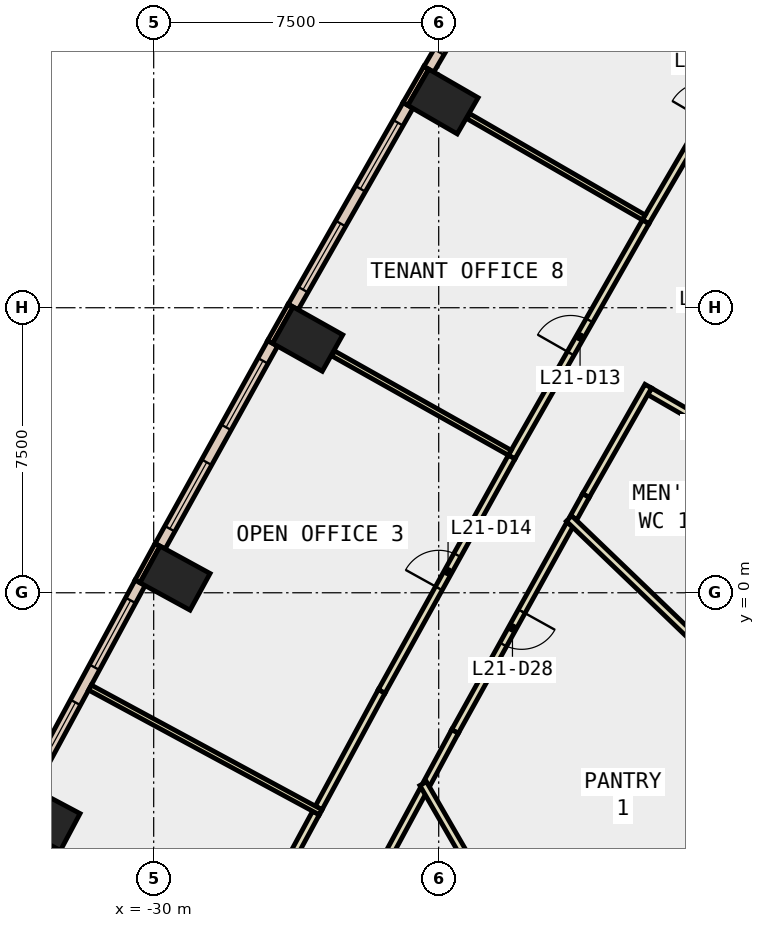
"""IFC4 building model, lengths in metres.
Left out: names, types, materials, properties, quantities, classifications, styles, units other than length and angle.
Written with IfcOpenShell. Run it as: python <this file> out.ifc"""

import sys

from ifc_helpers import new_model, si_unit, direction, frame, frame_2d, origin, origin_2d, place, context, subcontext, project, spatial, rectangle, extrude, element, fill, save


model = new_model("IFC4")
c1 = context("Model", 3, precision=1e-05, world=origin(), true_north=direction((0.0, 1.0)))
c2 = subcontext(c1, "Body", "Model", "MODEL_VIEW")
j1 = project(units=[si_unit("LENGTHUNIT", "METRE"), si_unit("PLANEANGLEUNIT", "RADIAN")], contexts=[c1])
p1 = place(None, origin())
s1 = spatial("IfcSite", under=j1, at=p1, CompositionType="ELEMENT")
p2 = place(p1, origin())
s2 = spatial("IfcBuilding", under=s1, at=p2, CompositionType="ELEMENT")
p3 = place(p2, frame((0.0, 0.0, 99.2)))
s3 = spatial("IfcBuildingStorey", under=s2, at=p3, CompositionType="ELEMENT", Elevation=99.2)
for number, where, z_axis, x_axis in (
    (1, (-22.387, 12.925, -0.4), (0.0, 0.0, 1.0), (0.5, 0.866, 0.0)),
    (2, (-25.948, 6.675, -0.4), (0.0, 0.0, 1.0), (0.49, 0.872, 0.0)),
    (3, (-29.438, 0.385, -0.4), (0.0, 0.0, 1.0), (0.48, 0.877, 0.0)),
    (4, (-32.858, -5.943, -0.4), (0.0, 0.0, 1.0), (0.469, 0.883, 0.0)),
):
    element("IfcColumn", number, at=place(p3, frame(where, z_axis=z_axis, x_axis=x_axis)), inside=s3, PredefinedType="COLUMN", context=c2, shape_type="SweptSolid", body=[
        extrude(rectangle(XDim=1.1, YDim=1.5, at=origin_2d()), origin(), (0.0, 0.0, 1.0), 4.2),
    ])
p4 = place(p3, frame((-9.31, -5.375, -0.4), z_axis=(0.0, 0.0, 1.0), x_axis=(-0.866017533419, -0.500013631625, 0.0)))
e5 = element("IfcWall", 5, at=p4, inside=s3, PredefinedType="SHEAR", context=c2, shape_type="SweptSolid", body=[
    extrude(rectangle(XDim=9.0, YDim=0.8, at=frame_2d((4.5, 0.0))), origin(), (0.0, 0.0, 1.0), 4.2),
])
p5 = place(p3, frame((-22.826, 13.814, 0.0), z_axis=(0.0, 0.0, 1.0), x_axis=(-0.499933745558, -0.866063652425, 0.0)))
e6 = element("IfcWall", 6, at=p5, inside=s3, PredefinedType="STANDARD", context=c2, shape_type="SweptSolid", body=[
    extrude(rectangle(XDim=1.1, YDim=0.15, at=frame_2d((0.55, 0.0))), origin(), (0.0, 0.0, 1.0), 3.8),
])
p6 = place(p3, frame((-26.398, 7.559, 0.0), z_axis=(0.0, 0.0, 1.0), x_axis=(-0.490008344094, -0.871717742574, 0.0)))
e7 = element("IfcWall", 7, at=p6, inside=s3, PredefinedType="STANDARD", context=c2, shape_type="SweptSolid", body=[
    extrude(rectangle(XDim=1.1, YDim=0.15, at=frame_2d((0.55, 0.0))), origin(), (0.0, 0.0, 1.0), 3.8),
])
p7 = place(p3, frame((-29.898, 1.264, 0.0), z_axis=(0.0, 0.0, 1.0), x_axis=(-0.479737645119, -0.877411985247, 0.0)))
e8 = element("IfcWall", 8, at=p7, inside=s3, PredefinedType="STANDARD", context=c2, shape_type="SweptSolid", body=[
    extrude(rectangle(XDim=1.101, YDim=0.15, at=frame_2d((0.55, 0.0))), origin(), (0.0, 0.0, 1.0), 3.8),
])
p8 = place(p3, frame((-19.677, 19.043, 0.0), z_axis=(0.0, 0.0, 1.0), x_axis=(-0.50490018297, -0.863177736759, 0.0)))
e9 = element("IfcWall", 9, at=p8, inside=s3, PredefinedType="STANDARD", context=c2, shape_type="SweptSolid", body=[
    extrude(rectangle(XDim=6.104, YDim=0.3, at=frame_2d((3.052, 0.0))), origin(), (0.0, 0.0, 1.0), 3.8),
])
p9 = place(p8, frame((0.526, 0.0, 0.9)))
e10 = element("IfcOpeningElement", 10, at=p9, cuts=e9, PredefinedType="OPENING", context=c2, shape_type="SweptSolid", body=[
    extrude(rectangle(XDim=2.0, YDim=2.6, at=frame_2d((1.0, 1.3))), frame((0.0, 0.16, 0.0), z_axis=(0.0, -1.0, 0.0), x_axis=(1.0, 0.0, 0.0)), (0.0, 0.0, 1.0), 0.32),
])
p10 = place(p8, frame((3.578, 0.0, 0.9)))
e11 = element("IfcOpeningElement", 11, at=p10, cuts=e9, PredefinedType="OPENING", context=c2, shape_type="SweptSolid", body=[
    extrude(rectangle(XDim=2.0, YDim=2.6, at=frame_2d((1.0, 1.3))), frame((0.0, 0.16, 0.0), z_axis=(0.0, -1.0, 0.0), x_axis=(1.0, 0.0, 0.0)), (0.0, 0.0, 1.0), 0.32),
])
p11 = place(p3, frame((-23.308, 12.823, 0.0), z_axis=(0.0, 0.0, 1.0), x_axis=(-0.495113375427, -0.868828375154, 0.0)))
e12 = element("IfcWall", 12, at=p11, inside=s3, PredefinedType="STANDARD", context=c2, shape_type="SweptSolid", body=[
    extrude(rectangle(XDim=6.104, YDim=0.3, at=frame_2d((3.052, 0.0))), origin(), (0.0, 0.0, 1.0), 3.8),
])
p12 = place(p11, frame((0.526, 0.0, 0.9)))
e13 = element("IfcOpeningElement", 13, at=p12, cuts=e12, PredefinedType="OPENING", context=c2, shape_type="SweptSolid", body=[
    extrude(rectangle(XDim=2.0, YDim=2.6, at=frame_2d((1.0, 1.3))), frame((0.0, 0.16, 0.0), z_axis=(0.0, -1.0, 0.0), x_axis=(1.0, 0.0, 0.0)), (0.0, 0.0, 1.0), 0.32),
])
p13 = place(p11, frame((3.578, 0.0, 0.9)))
e14 = element("IfcOpeningElement", 14, at=p13, cuts=e12, PredefinedType="OPENING", context=c2, shape_type="SweptSolid", body=[
    extrude(rectangle(XDim=2.0, YDim=2.6, at=frame_2d((1.0, 1.3))), frame((0.0, 0.16, 0.0), z_axis=(0.0, -1.0, 0.0), x_axis=(1.0, 0.0, 0.0)), (0.0, 0.0, 1.0), 0.32),
])
p14 = place(p3, frame((-26.869, 6.562, 0.0), z_axis=(0.0, 0.0, 1.0), x_axis=(-0.485170774404, -0.874419418623, 0.0)))
e15 = element("IfcWall", 15, at=p14, inside=s3, PredefinedType="STANDARD", context=c2, shape_type="SweptSolid", body=[
    extrude(rectangle(XDim=6.103, YDim=0.3, at=frame_2d((3.052, 0.0))), origin(), (0.0, 0.0, 1.0), 3.8),
])
p15 = place(p14, frame((0.526, 0.0, 0.9)))
e16 = element("IfcOpeningElement", 16, at=p15, cuts=e15, PredefinedType="OPENING", context=c2, shape_type="SweptSolid", body=[
    extrude(rectangle(XDim=2.0, YDim=2.6, at=frame_2d((1.0, 1.3))), frame((0.0, 0.16, 0.0), z_axis=(0.0, -1.0, 0.0), x_axis=(1.0, 0.0, 0.0)), (0.0, 0.0, 1.0), 0.32),
])
p16 = place(p14, frame((3.578, 0.0, 0.9)))
e17 = element("IfcOpeningElement", 17, at=p16, cuts=e15, PredefinedType="OPENING", context=c2, shape_type="SweptSolid", body=[
    extrude(rectangle(XDim=2.0, YDim=2.6, at=frame_2d((1.0, 1.3))), frame((0.0, 0.16, 0.0), z_axis=(0.0, -1.0, 0.0), x_axis=(1.0, 0.0, 0.0)), (0.0, 0.0, 1.0), 0.32),
])
p17 = place(p3, frame((-30.357, 0.262, 0.0), z_axis=(0.0, 0.0, 1.0), x_axis=(-0.475573079782, -0.879676216449, 0.0)))
e18 = element("IfcWall", 18, at=p17, inside=s3, PredefinedType="STANDARD", context=c2, shape_type="SweptSolid", body=[
    extrude(rectangle(XDim=6.104, YDim=0.3, at=frame_2d((3.052, 0.0))), origin(), (0.0, 0.0, 1.0), 3.8),
])
p18 = place(p17, frame((0.526, 0.0, 0.9)))
e19 = element("IfcOpeningElement", 19, at=p18, cuts=e18, PredefinedType="OPENING", context=c2, shape_type="SweptSolid", body=[
    extrude(rectangle(XDim=2.0, YDim=2.6, at=frame_2d((1.0, 1.3))), frame((0.0, 0.16, 0.0), z_axis=(0.0, -1.0, 0.0), x_axis=(1.0, 0.0, 0.0)), (0.0, 0.0, 1.0), 0.32),
])
p19 = place(p17, frame((3.578, 0.0, 0.9)))
e20 = element("IfcOpeningElement", 20, at=p19, cuts=e18, PredefinedType="OPENING", context=c2, shape_type="SweptSolid", body=[
    extrude(rectangle(XDim=2.0, YDim=2.6, at=frame_2d((1.0, 1.3))), frame((0.0, 0.16, 0.0), z_axis=(0.0, -1.0, 0.0), x_axis=(1.0, 0.0, 0.0)), (0.0, 0.0, 1.0), 0.32),
])
p20 = place(p3, frame((-15.86, 4.671, 0.0), z_axis=(0.0, 0.0, 1.0), x_axis=(-0.866192052573, 0.49971124468, 0.0)))
e21 = element("IfcWall", 21, at=p20, inside=s3, PredefinedType="PARTITIONING", context=c2, shape_type="SweptSolid", body=[
    extrude(rectangle(XDim=1.257, YDim=0.2, at=frame_2d((0.628, 0.0))), origin(), (0.0, 0.0, 1.0), 3.8),
])
p21 = place(p3, frame((-16.986, 5.436, 0.0), z_axis=(0.0, 0.0, 1.0), x_axis=(-0.49514688151, -0.868809280412, 0.0)))
e22 = element("IfcWall", 22, at=p21, inside=s3, PredefinedType="PARTITIONING", context=c2, shape_type="SweptSolid", body=[
    extrude(rectangle(XDim=3.314, YDim=0.2, at=frame_2d((1.657, 0.0))), origin(), (0.0, 0.0, 1.0), 3.8),
])
p22 = place(p3, frame((-18.627, 2.557, 0.0), z_axis=(0.0, 0.0, 1.0), x_axis=(-0.484771582084, -0.874640790956, 0.0)))
e23 = element("IfcWall", 23, at=p22, inside=s3, PredefinedType="PARTITIONING", context=c2, shape_type="SweptSolid", body=[
    extrude(rectangle(XDim=0.666, YDim=0.2, at=frame_2d((0.333, 0.0))), origin(), (0.0, 0.0, 1.0), 3.8),
])
p23 = place(p3, frame((-19.047, 1.799, 0.0), z_axis=(0.0, 0.0, 1.0), x_axis=(-0.485240396382, -0.87438078531, 0.0)))
e24 = element("IfcWall", 24, at=p23, inside=s3, PredefinedType="PARTITIONING", context=c2, shape_type="SweptSolid", body=[
    extrude(rectangle(XDim=6.232, YDim=0.2, at=frame_2d((3.116, 0.0))), origin(), (0.0, 0.0, 1.0), 3.8),
])
p24 = place(p23, frame((2.616, 0.0, 0.0)))
e25 = element("IfcOpeningElement", 25, at=p24, cuts=e24, PredefinedType="OPENING", context=c2, shape_type="SweptSolid", body=[
    extrude(rectangle(XDim=1.0, YDim=2.1, at=frame_2d((0.5, 1.05))), frame((0.0, 0.11, 0.0), z_axis=(0.0, -1.0, 0.0), x_axis=(1.0, 0.0, 0.0)), (0.0, 0.0, 1.0), 0.22),
])
p25 = place(p3, frame((-22.071, -3.65, 0.0), z_axis=(0.0, 0.0, 1.0), x_axis=(-0.475212034938, -0.879871309823, 0.0)))
e26 = element("IfcWall", 26, at=p25, inside=s3, PredefinedType="PARTITIONING", context=c2, shape_type="SweptSolid", body=[
    extrude(rectangle(XDim=1.557, YDim=0.2, at=frame_2d((0.779, 0.0))), origin(), (0.0, 0.0, 1.0), 3.8),
])
p26 = place(p3, frame((-22.906, -5.196, 0.0), z_axis=(0.0, 0.0, 1.0), x_axis=(-0.475448213767, -0.879743710421, 0.0)))
e27 = element("IfcWall", 27, at=p26, inside=s3, PredefinedType="PARTITIONING", context=c2, shape_type="SweptSolid", body=[
    extrude(rectangle(XDim=5.343, YDim=0.2, at=frame_2d((2.671, 0.0))), origin(), (0.0, 0.0, 1.0), 3.8),
])
p27 = place(p3, frame((-17.055, 9.76, 0.0), z_axis=(0.0, 0.0, 1.0), x_axis=(0.504817517618, 0.863226085047, 0.0)))
e28 = element("IfcWall", 28, at=p27, inside=s3, PredefinedType="PARTITIONING", context=c2, shape_type="SweptSolid", body=[
    extrude(rectangle(XDim=7.199, YDim=0.2, at=frame_2d((3.599, 0.0))), origin(), (0.0, 0.0, 1.0), 3.8),
])
p28 = place(p27, frame((3.099, 0.0, 0.0)))
e29 = element("IfcOpeningElement", 29, at=p28, cuts=e28, PredefinedType="OPENING", context=c2, shape_type="SweptSolid", body=[
    extrude(rectangle(XDim=1.0, YDim=2.1, at=frame_2d((0.5, 1.05))), frame((0.0, 0.11, 0.0), z_axis=(0.0, -1.0, 0.0), x_axis=(1.0, 0.0, 0.0)), (0.0, 0.0, 1.0), 0.22),
])
p29 = place(p3, frame((-20.581, 3.571, 0.0), z_axis=(0.0, 0.0, 1.0), x_axis=(0.495138372197, 0.868814129937, 0.0)))
e30 = element("IfcWall", 30, at=p29, inside=s3, PredefinedType="PARTITIONING", context=c2, shape_type="SweptSolid", body=[
    extrude(rectangle(XDim=7.124, YDim=0.2, at=frame_2d((3.562, 0.0))), origin(), (0.0, 0.0, 1.0), 3.8),
])
p30 = place(p29, frame((3.137, 0.0, 0.0)))
e31 = element("IfcOpeningElement", 31, at=p30, cuts=e30, PredefinedType="OPENING", context=c2, shape_type="SweptSolid", body=[
    extrude(rectangle(XDim=1.0, YDim=2.1, at=frame_2d((0.5, 1.05))), frame((0.0, 0.11, 0.0), z_axis=(0.0, -1.0, 0.0), x_axis=(1.0, 0.0, 0.0)), (0.0, 0.0, 1.0), 0.22),
])
p31 = place(p3, frame((-25.658, -5.661, 0.0), z_axis=(0.0, 0.0, 1.0), x_axis=(0.47543942367, 0.87974846088, 0.0)))
e32 = element("IfcWall", 32, at=p31, inside=s3, PredefinedType="PARTITIONING", context=c2, shape_type="SweptSolid", body=[
    extrude(rectangle(XDim=3.487, YDim=0.2, at=frame_2d((1.744, 0.0))), origin(), (0.0, 0.0, 1.0), 3.8),
])
p32 = place(p3, frame((-24.0, -2.593, 0.0), z_axis=(0.0, 0.0, 1.0), x_axis=(0.485148833338, 0.874431592242, 0.0)))
e33 = element("IfcWall", 33, at=p32, inside=s3, PredefinedType="PARTITIONING", context=c2, shape_type="SweptSolid", body=[
    extrude(rectangle(XDim=7.049, YDim=0.2, at=frame_2d((3.525, 0.0))), origin(), (0.0, 0.0, 1.0), 3.8),
])
p33 = place(p32, frame((3.099, 0.0, 0.0)))
e34 = element("IfcOpeningElement", 34, at=p33, cuts=e33, PredefinedType="OPENING", context=c2, shape_type="SweptSolid", body=[
    extrude(rectangle(XDim=1.0, YDim=2.1, at=frame_2d((0.5, 1.05))), frame((0.0, 0.11, 0.0), z_axis=(0.0, -1.0, 0.0), x_axis=(1.0, 0.0, 0.0)), (0.0, 0.0, 1.0), 0.22),
])
p34 = place(p3, frame((-27.387, -8.861, 0.0), z_axis=(0.0, 0.0, 1.0), x_axis=(0.475193364801, 0.879881393171, 0.0)))
e35 = element("IfcWall", 35, at=p34, inside=s3, PredefinedType="PARTITIONING", context=c2, shape_type="SweptSolid", body=[
    extrude(rectangle(XDim=3.487, YDim=0.2, at=frame_2d((1.744, 0.0))), origin(), (0.0, 0.0, 1.0), 3.8),
])
p35 = place(p3, frame((-19.278, -11.309, 0.0), z_axis=(0.0, 0.0, 1.0), x_axis=(-0.500044545065, 0.865999684151, 0.0)))
e36 = element("IfcWall", 36, at=p35, inside=s3, PredefinedType="PARTITIONING", context=c2, shape_type="SweptSolid", body=[
    extrude(rectangle(XDim=7.261, YDim=0.2, at=frame_2d((3.63, 0.0))), origin(), (0.0, 0.0, 1.0), 3.8),
])
p36 = place(p3, frame((-17.104, 9.875, 0.0), z_axis=(0.0, 0.0, 1.0), x_axis=(-0.866024640963, 0.500001321243, 0.0)))
e37 = element("IfcWall", 37, at=p36, inside=s3, PredefinedType="PARTITIONING", context=c2, shape_type="SweptSolid", body=[
    extrude(rectangle(XDim=5.33, YDim=0.15, at=frame_2d((2.665, 0.0))), origin(), (0.0, 0.0, 1.0), 3.8),
])
p37 = place(p3, frame((-20.631, 3.685, 0.0), z_axis=(0.0, 0.0, 1.0), x_axis=(-0.871680720442, 0.490074200106, 0.0)))
e38 = element("IfcWall", 38, at=p37, inside=s3, PredefinedType="PARTITIONING", context=c2, shape_type="SweptSolid", body=[
    extrude(rectangle(XDim=5.33, YDim=0.15, at=frame_2d((2.665, 0.0))), origin(), (0.0, 0.0, 1.0), 3.8),
])
p38 = place(p3, frame((-25.606, -5.775, 0.0), z_axis=(0.0, 0.0, 1.0), x_axis=(-0.87974530848, 0.475445256793, 0.0)))
e39 = element("IfcWall", 39, at=p38, inside=s3, PredefinedType="PARTITIONING", context=c2, shape_type="SweptSolid", body=[
    extrude(rectangle(XDim=6.901, YDim=0.15, at=frame_2d((3.45, 0.0))), origin(), (0.0, 0.0, 1.0), 3.8),
])
p39 = place(p3, frame((-10.96, -5.834, 0.0), z_axis=(0.0, 0.0, 1.0), x_axis=(-0.721236335428, 0.692689070549, 0.0)))
e40 = element("IfcWall", 40, at=p39, inside=s3, PredefinedType="PARTITIONING", context=c2, shape_type="SweptSolid", body=[
    extrude(rectangle(XDim=11.246, YDim=0.2, at=frame_2d((5.623, 0.0))), origin(), (0.0, 0.0, 1.0), 3.8),
])
p40 = place(p10, origin())
e41 = element("IfcWindow", 41, at=p40, inside=s3, PartitioningType="SINGLE_PANEL", PredefinedType="WINDOW", context=c2, shape_type="SweptSolid", body=[
    extrude(rectangle(XDim=2.0, YDim=2.6, at=frame_2d((1.0, 1.3))), frame((0.0, 0.03, 0.0), z_axis=(0.0, -1.0, 0.0), x_axis=(1.0, 0.0, 0.0)), (0.0, 0.0, 1.0), 0.06),
])
fill(e11, e41)
p41 = place(p12, origin())
e42 = element("IfcWindow", 42, at=p41, inside=s3, PartitioningType="SINGLE_PANEL", PredefinedType="WINDOW", context=c2, shape_type="SweptSolid", body=[
    extrude(rectangle(XDim=2.0, YDim=2.6, at=frame_2d((1.0, 1.3))), frame((0.0, 0.03, 0.0), z_axis=(0.0, -1.0, 0.0), x_axis=(1.0, 0.0, 0.0)), (0.0, 0.0, 1.0), 0.06),
])
fill(e13, e42)
p42 = place(p13, origin())
e43 = element("IfcWindow", 43, at=p42, inside=s3, PartitioningType="SINGLE_PANEL", PredefinedType="WINDOW", context=c2, shape_type="SweptSolid", body=[
    extrude(rectangle(XDim=2.0, YDim=2.6, at=frame_2d((1.0, 1.3))), frame((0.0, 0.03, 0.0), z_axis=(0.0, -1.0, 0.0), x_axis=(1.0, 0.0, 0.0)), (0.0, 0.0, 1.0), 0.06),
])
fill(e14, e43)
p43 = place(p15, origin())
e44 = element("IfcWindow", 44, at=p43, inside=s3, PartitioningType="SINGLE_PANEL", PredefinedType="WINDOW", context=c2, shape_type="SweptSolid", body=[
    extrude(rectangle(XDim=2.0, YDim=2.6, at=frame_2d((1.0, 1.3))), frame((0.0, 0.03, 0.0), z_axis=(0.0, -1.0, 0.0), x_axis=(1.0, 0.0, 0.0)), (0.0, 0.0, 1.0), 0.06),
])
fill(e16, e44)
p44 = place(p16, origin())
e45 = element("IfcWindow", 45, at=p44, inside=s3, PartitioningType="SINGLE_PANEL", PredefinedType="WINDOW", context=c2, shape_type="SweptSolid", body=[
    extrude(rectangle(XDim=2.0, YDim=2.6, at=frame_2d((1.0, 1.3))), frame((0.0, 0.03, 0.0), z_axis=(0.0, -1.0, 0.0), x_axis=(1.0, 0.0, 0.0)), (0.0, 0.0, 1.0), 0.06),
])
fill(e17, e45)
p45 = place(p18, origin())
e46 = element("IfcWindow", 46, at=p45, inside=s3, PartitioningType="SINGLE_PANEL", PredefinedType="WINDOW", context=c2, shape_type="SweptSolid", body=[
    extrude(rectangle(XDim=2.0, YDim=2.6, at=frame_2d((1.0, 1.3))), frame((0.0, 0.03, 0.0), z_axis=(0.0, -1.0, 0.0), x_axis=(1.0, 0.0, 0.0)), (0.0, 0.0, 1.0), 0.06),
])
fill(e19, e46)
p46 = place(p19, origin())
e47 = element("IfcWindow", 47, at=p46, inside=s3, PartitioningType="SINGLE_PANEL", PredefinedType="WINDOW", context=c2, shape_type="SweptSolid", body=[
    extrude(rectangle(XDim=2.0, YDim=2.6, at=frame_2d((1.0, 1.3))), frame((0.0, 0.03, 0.0), z_axis=(0.0, -1.0, 0.0), x_axis=(1.0, 0.0, 0.0)), (0.0, 0.0, 1.0), 0.06),
])
fill(e20, e47)
p47 = place(p30, origin())
e48 = element("IfcDoor", 48, at=p47, inside=s3, OperationType="SINGLE_SWING_LEFT", PredefinedType="DOOR", context=c2, shape_type="SweptSolid", body=[
    extrude(rectangle(XDim=1.0, YDim=2.1, at=frame_2d((0.5, 1.05))), frame((0.0, 0.025, 0.0), z_axis=(0.0, -1.0, 0.0), x_axis=(1.0, 0.0, 0.0)), (0.0, 0.0, 1.0), 0.05),
])
fill(e31, e48)
p48 = place(p33, origin())
e49 = element("IfcDoor", 49, at=p48, inside=s3, OperationType="SINGLE_SWING_LEFT", PredefinedType="DOOR", context=c2, shape_type="SweptSolid", body=[
    extrude(rectangle(XDim=1.0, YDim=2.1, at=frame_2d((0.5, 1.05))), frame((0.0, 0.025, 0.0), z_axis=(0.0, -1.0, 0.0), x_axis=(1.0, 0.0, 0.0)), (0.0, 0.0, 1.0), 0.05),
])
fill(e34, e49)
p49 = place(p24, origin())
e50 = element("IfcDoor", 50, at=p49, inside=s3, OperationType="SINGLE_SWING_LEFT", PredefinedType="DOOR", context=c2, shape_type="SweptSolid", body=[
    extrude(rectangle(XDim=1.0, YDim=2.1, at=frame_2d((0.5, 1.05))), frame((0.0, 0.025, 0.0), z_axis=(0.0, -1.0, 0.0), x_axis=(1.0, 0.0, 0.0)), (0.0, 0.0, 1.0), 0.05),
])
fill(e25, e50)
save(model, sys.argv[1])
